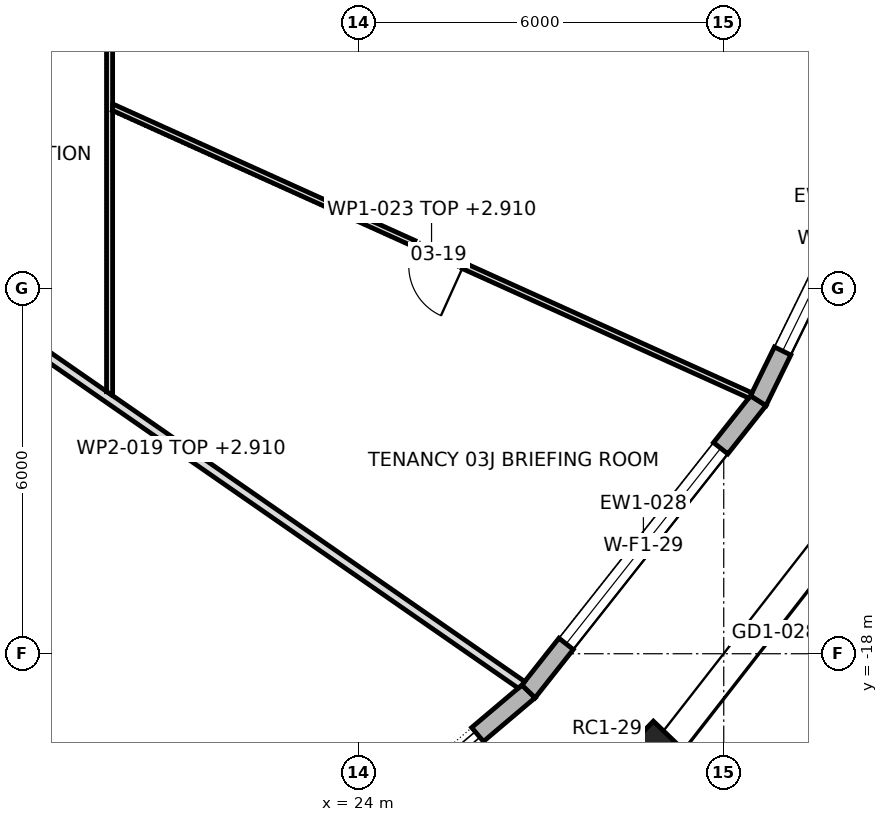
"""IFC4 building model, lengths in metres.
Left out: names, types, materials, properties, quantities, classifications, styles, units other than length and angle.
Written with IfcOpenShell. Run it as: python <this file> out.ifc"""

import sys

from ifc_helpers import new_model, si_unit, direction, frame, frame_2d, origin, origin_2d, place, context, subcontext, project, spatial, polyline, rectangle, outline, extrude, element, fill, save


model = new_model("IFC4")
c1 = context("Model", 3, precision=1e-05, world=origin(), true_north=direction((0.0, 1.0)))
c2 = subcontext(c1, "Body", "Model", "MODEL_VIEW")
j1 = project(units=[si_unit("LENGTHUNIT", "METRE"), si_unit("PLANEANGLEUNIT", "RADIAN")], contexts=[c1])
p1 = place(None, origin())
s1 = spatial("IfcSite", under=j1, at=p1, CompositionType="ELEMENT")
p2 = place(p1, origin())
s2 = spatial("IfcBuilding", under=s1, at=p2, CompositionType="ELEMENT")
p3 = place(p2, frame((0.0, 0.0, 57.1)))
s3 = spatial("IfcBuildingStorey", under=s2, at=p3, CompositionType="ELEMENT", Elevation=57.1)
p4 = place(p3, frame((28.581, -20.105, 0.0), z_axis=(0.0, 0.0, 1.0), x_axis=(0.691577351953, 0.722302406382, 0.0)))
e1 = element("IfcColumn", 1, at=p4, inside=s3, PredefinedType="COLUMN", context=c2, shape_type="SweptSolid", body=[
    extrude(rectangle(XDim=1.8, YDim=1.0, at=origin_2d()), origin(), (0.0, 0.0, 1.0), 4.2),
])
p5 = place(p3, frame((21.983, -22.684, 0.0), z_axis=(0.0, 0.0, 1.0), x_axis=(0.763614259808, 0.645672720671, 0.0)))
e2 = element("IfcWall", 2, at=p5, inside=s3, PredefinedType="STANDARD", context=c2, shape_type="SweptSolid", body=[
    extrude(outline(polyline([(-0.014, -0.15), (6.31, -0.15), (6.28, 0.15), (0.014, 0.15), (-0.014, -0.15)])), origin(), (0.0, 0.0, 1.0), 3.9),
])
p6 = place(p5, frame((1.097, 0.0, 0.0)))
e3 = element("IfcOpeningElement", 3, at=p6, cuts=e2, PredefinedType="OPENING", context=c2, shape_type="SweptSolid", body=[
    extrude(rectangle(XDim=4.1, YDim=3.45, at=frame_2d((2.05, 1.725))), frame((0.0, 0.162, 0.0), z_axis=(0.0, -1.0, 0.0), x_axis=(1.0, 0.0, 0.0)), (0.0, 0.0, 1.0), 0.324),
])
p7 = place(p3, frame((26.79, -18.62, 0.0), z_axis=(0.0, 0.0, 1.0), x_axis=(0.619993638342, 0.78460683684, 0.0)))
e4 = element("IfcWall", 4, at=p7, inside=s3, PredefinedType="STANDARD", context=c2, shape_type="SweptSolid", body=[
    extrude(outline(polyline([(-0.015, -0.15), (6.11, -0.15), (6.078, 0.15), (0.015, 0.15), (-0.015, -0.15)])), origin(), (0.0, 0.0, 1.0), 3.9),
])
p8 = place(p7, frame((0.997, 0.0, 0.6)))
e5 = element("IfcOpeningElement", 5, at=p8, cuts=e4, PredefinedType="OPENING", context=c2, shape_type="SweptSolid", body=[
    extrude(rectangle(XDim=4.1, YDim=2.85, at=frame_2d((2.05, 1.425))), frame((0.0, 0.162, 0.0), z_axis=(0.0, -1.0, 0.0), x_axis=(1.0, 0.0, 0.0)), (0.0, 0.0, 1.0), 0.324),
])
p9 = place(p3, frame((30.568, -13.838, 0.0), z_axis=(0.0, 0.0, 1.0), x_axis=(0.439906146647, 0.898043752911, 0.0)))
e6 = element("IfcWall", 6, at=p9, inside=s3, PredefinedType="STANDARD", context=c2, shape_type="SweptSolid", body=[
    extrude(outline(polyline([(-0.016, -0.15), (5.936, -0.15), (5.902, 0.15), (0.016, 0.15), (-0.016, -0.15)])), origin(), (0.0, 0.0, 1.0), 3.9),
])
p10 = place(p9, frame((0.909, 0.0, 0.6)))
e7 = element("IfcOpeningElement", 7, at=p10, cuts=e6, PredefinedType="OPENING", context=c2, shape_type="SweptSolid", body=[
    extrude(rectangle(XDim=4.1, YDim=2.85, at=frame_2d((2.05, 1.425))), frame((0.0, 0.162, 0.0), z_axis=(0.0, -1.0, 0.0), x_axis=(1.0, 0.0, 0.0)), (0.0, 0.0, 1.0), 0.324),
])
p11 = place(p3, frame((15.433, -10.712, 0.0), z_axis=(0.0, 0.0, 1.0), x_axis=(0.82159356676, -0.570073689148, 0.0)))
e8 = element("IfcWall", 8, at=p11, inside=s3, PredefinedType="PARTITIONING", context=c2, shape_type="SweptSolid", body=[
    extrude(outline(polyline([(0.104, -0.075), (2.042, -0.075), (3.979, -0.075), (5.917, -0.075), (7.855, -0.075), (9.793, -0.075), (11.731, -0.075), (13.669, -0.075), (13.69, 0.002), (13.694, 0.074), (13.694, 0.075), (12.021, 0.075), (10.349, 0.075), (8.676, 0.075), (7.004, 0.075), (5.331, 0.075), (5.327, 0.072), (5.325, 0.075), (3.55, 0.075), (1.775, 0.075), (0.0, 0.075), (0.0, 0.074), (0.104, -0.075)])), origin(), (0.0, 0.0, 1.0), 2.91),
])
p12 = place(p3, frame((19.9, -13.756, 0.0), z_axis=(0.0, 0.0, 1.0), x_axis=(0.0, 1.0, 0.0)))
e9 = element("IfcWall", 9, at=p12, inside=s3, PredefinedType="PARTITIONING", context=c2, shape_type="SweptSolid", body=[
    extrude(outline(polyline([(0.0, -0.05), (1.563, -0.05), (3.125, -0.05), (4.688, -0.05), (4.689, -0.048), (4.694, -0.05), (6.525, -0.05), (8.357, -0.05), (10.188, -0.05), (12.02, -0.05), (12.028, 0.049), (12.028, 0.05), (10.035, 0.05), (8.042, 0.05), (6.049, 0.05), (4.056, 0.05), (2.062, 0.05), (0.069, 0.05), (0.0, -0.05), (0.0, -0.05)])), origin(), (0.0, 0.0, 1.0), 3.9),
])
p13 = place(p12, frame((7.98, 0.0, 0.0)))
e10 = element("IfcOpeningElement", 10, at=p13, cuts=e9, PredefinedType="OPENING", context=c2, shape_type="SweptSolid", body=[
    extrude(rectangle(XDim=0.9, YDim=2.1, at=frame_2d((0.45, 1.05))), frame((0.0, 0.062, 0.0), z_axis=(0.0, -1.0, 0.0), x_axis=(1.0, 0.0, 0.0)), (0.0, 0.0, 1.0), 0.124),
])
p14 = place(p3, frame((19.93, -9.003, 0.0), z_axis=(0.0, 0.0, 1.0), x_axis=(0.911257901719, -0.41183617684, 0.0)))
e11 = element("IfcWall", 11, at=p14, inside=s3, PredefinedType="PARTITIONING", context=c2, shape_type="SweptSolid", body=[
    extrude(outline(polyline([(0.045, -0.05), (1.958, -0.05), (3.871, -0.05), (5.785, -0.05), (7.698, -0.05), (9.611, -0.05), (11.524, -0.05), (11.536, -0.004), (11.537, 0.048), (11.537, 0.05), (9.615, 0.05), (7.692, 0.05), (5.769, 0.05), (3.846, 0.05), (1.923, 0.05), (0.0, 0.05), (0.0, 0.049), (0.045, -0.05)])), origin(), (0.0, 0.0, 1.0), 2.91),
])
p15 = place(p14, frame((5.454, 0.0, 0.0)))
e12 = element("IfcOpeningElement", 12, at=p15, cuts=e11, PredefinedType="OPENING", context=c2, shape_type="SweptSolid", body=[
    extrude(rectangle(XDim=0.9, YDim=2.1, at=frame_2d((0.45, 1.05))), frame((0.0, 0.062, 0.0), z_axis=(0.0, -1.0, 0.0), x_axis=(1.0, 0.0, 0.0)), (0.0, 0.0, 1.0), 0.124),
])
p16 = place(p6, origin())
e13 = element("IfcDoor", 13, at=p16, inside=s3, OperationType="DOUBLE_DOOR_SLIDING", PredefinedType="DOOR", context=c2, shape_type="SweptSolid", body=[
    extrude(rectangle(XDim=4.1, YDim=3.45, at=frame_2d((2.05, 1.725))), frame((0.0, 0.025, 0.0), z_axis=(0.0, -1.0, 0.0), x_axis=(1.0, 0.0, 0.0)), (0.0, 0.0, 1.0), 0.05),
])
fill(e3, e13)
p17 = place(p8, origin())
e14 = element("IfcWindow", 14, at=p17, inside=s3, PartitioningType="TRIPLE_PANEL_VERTICAL", PredefinedType="WINDOW", context=c2, shape_type="SweptSolid", body=[
    extrude(rectangle(XDim=4.1, YDim=2.85, at=frame_2d((2.05, 1.425))), frame((0.0, 0.03, 0.0), z_axis=(0.0, -1.0, 0.0), x_axis=(1.0, 0.0, 0.0)), (0.0, 0.0, 1.0), 0.06),
])
fill(e5, e14)
p18 = place(p10, origin())
e15 = element("IfcWindow", 15, at=p18, inside=s3, PartitioningType="TRIPLE_PANEL_VERTICAL", PredefinedType="WINDOW", context=c2, shape_type="SweptSolid", body=[
    extrude(rectangle(XDim=4.1, YDim=2.85, at=frame_2d((2.05, 1.425))), frame((0.0, 0.03, 0.0), z_axis=(0.0, -1.0, 0.0), x_axis=(1.0, 0.0, 0.0)), (0.0, 0.0, 1.0), 0.06),
])
fill(e7, e15)
p19 = place(p15, frame((0.9, 0.0, 0.0), z_axis=(0.0, 0.0, 1.0), x_axis=(-1.0, 0.0, 0.0)))
e16 = element("IfcDoor", 16, at=p19, inside=s3, OperationType="SINGLE_SWING_RIGHT", PredefinedType="DOOR", context=c2, shape_type="SweptSolid", body=[
    extrude(rectangle(XDim=0.9, YDim=2.1, at=frame_2d((0.45, 1.05))), frame((0.0, 0.025, 0.0), z_axis=(0.0, -1.0, 0.0), x_axis=(1.0, 0.0, 0.0)), (0.0, 0.0, 1.0), 0.05),
])
fill(e12, e16)
save(model, sys.argv[1])
